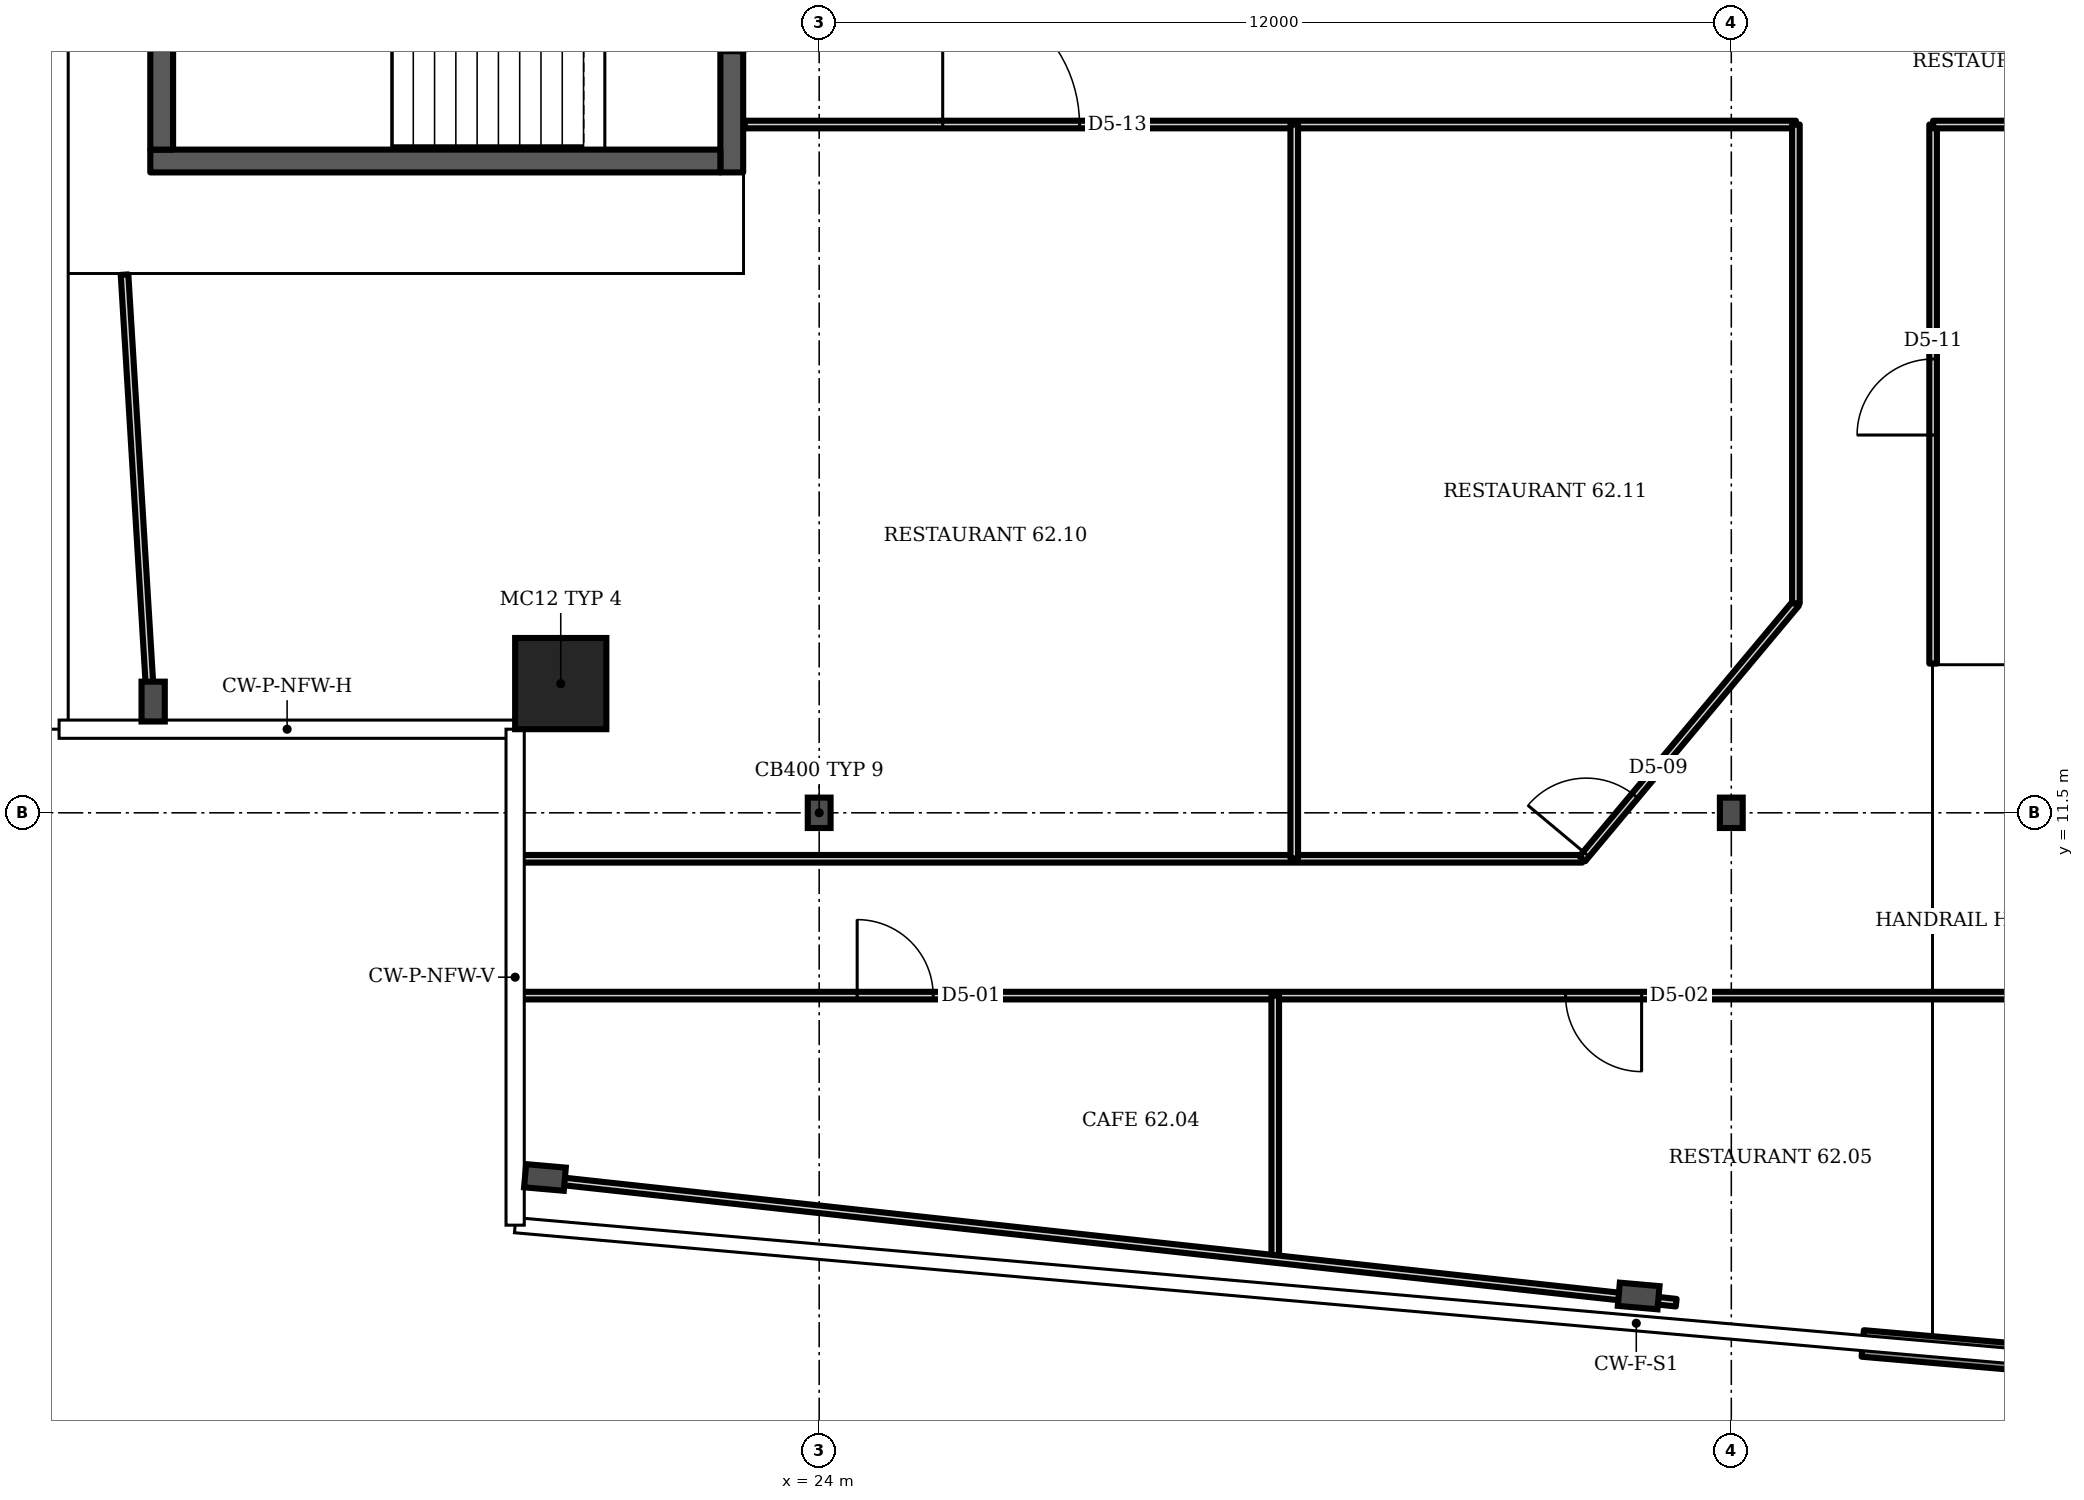
"""IFC4 building model, lengths in metres.
Left out: names, types, materials, properties, quantities, classifications, styles, units other than length and angle.
Written with IfcOpenShell. Run it as: python <this file> out.ifc"""

import sys

from ifc_helpers import new_model, si_unit, direction, frame, frame_2d, origin, origin_2d, place, context, subcontext, project, spatial, rectangle, i_section, extrude, element, fill, save


model = new_model("IFC4")
c1 = context("Model", 3, precision=1e-05, world=origin(), true_north=direction((0.0, 1.0)))
c2 = subcontext(c1, "Body", "Model", "MODEL_VIEW")
j1 = project(units=[si_unit("LENGTHUNIT", "METRE"), si_unit("PLANEANGLEUNIT", "RADIAN")], contexts=[c1])
p1 = place(None, origin())
s1 = spatial("IfcSite", under=j1, at=p1, CompositionType="ELEMENT")
p2 = place(p1, origin())
s2 = spatial("IfcBuilding", under=s1, at=p2, CompositionType="ELEMENT")
p3 = place(p2, frame((0.0, 0.0, 246.7)))
s3 = spatial("IfcBuildingStorey", under=s2, at=p3, CompositionType="ELEMENT", Elevation=246.7)
p4 = place(p3, frame((20.6, 13.2, 0.0), z_axis=(0.0, 0.0, 1.0), x_axis=(1.0, 0.0, 0.0)))
e1 = element("IfcColumn", 1, at=p4, inside=s3, PredefinedType="COLUMN", context=c2, shape_type="SweptSolid", body=[
    extrude(rectangle(XDim=1.2, YDim=1.2, at=origin_2d()), origin(), (0.0, 0.0, 1.0), 3.6),
])
for number, where, z_axis, x_axis in (
    (2, (20.392, 6.703, 0.0), (0.0, 0.0, 1.0), (-0.087, -0.996, 0.0)),
    (3, (34.781, 5.143, 0.0), (0.0, 0.0, 1.0), (-0.087, -0.996, 0.0)),
    (4, (15.238, 12.963, 0.0), (0.0, 0.0, 1.0), (-1.0, 0.0, 0.0)),
):
    element("IfcColumn", number, at=place(p3, frame(where, z_axis=z_axis, x_axis=x_axis)), inside=s3, PredefinedType="COLUMN", context=c2, shape_type="SweptSolid", body=[
        extrude(i_section(OverallWidth=0.306, OverallDepth=0.524, WebThickness=0.021, FlangeThickness=0.04, FilletRadius=0.027, at=origin_2d()), origin(), (0.0, 0.0, 1.0), 3.6),
    ])
for number, where, z_axis, x_axis in (
    (5, (24.0, 11.5, 0.0), (0.0, 0.0, 1.0), (1.0, 0.0, 0.0)),
    (6, (36.0, 11.5, 0.0), (0.0, 0.0, 1.0), (1.0, 0.0, 0.0)),
):
    element("IfcColumn", number, at=place(p3, frame(where, z_axis=z_axis, x_axis=x_axis)), inside=s3, PredefinedType="COLUMN", context=c2, shape_type="SweptSolid", body=[
        extrude(i_section(OverallWidth=0.3, OverallDepth=0.4, WebThickness=0.013, FlangeThickness=0.024, FilletRadius=0.027, at=origin_2d()), origin(), (0.0, 0.0, 1.0), 3.6),
    ])
p5 = place(p3, frame((37.729, 4.519, 0.0), z_axis=(0.0, 0.0, 1.0), x_axis=(0.99619, -0.087167, 0.0)))
e7 = element("IfcWall", 7, at=p5, inside=s3, PredefinedType="SOLIDWALL", context=c2, shape_type="SweptSolid", body=[
    extrude(rectangle(XDim=11.831, YDim=0.35, at=frame_2d((5.915, 0.0))), origin(), (0.0, 0.0, 1.0), 1.0),
])
p6 = place(p3, frame((22.85, 19.925, 0.0), z_axis=(0.0, 0.0, 1.0), x_axis=(0.0, 1.0, 0.0)))
e8 = element("IfcWall", 8, at=p6, inside=s3, PredefinedType="SHEAR", context=c2, shape_type="SweptSolid", body=[
    extrude(rectangle(XDim=4.35, YDim=0.3, at=frame_2d((2.175, 0.0))), origin(), (0.0, 0.0, 1.0), 3.2),
])
p7 = place(p6, frame((1.575, 0.0, 0.0)))
e9 = element("IfcOpeningElement", 9, at=p7, cuts=e8, PredefinedType="OPENING", context=c2, shape_type="SweptSolid", body=[
    extrude(rectangle(XDim=1.2, YDim=2.1, at=frame_2d((0.6, 1.05))), frame((0.0, 0.16, 0.0), z_axis=(0.0, -1.0, 0.0), x_axis=(1.0, 0.0, 0.0)), (0.0, 0.0, 1.0), 0.32),
])
p8 = place(p3, frame((15.224, 12.62, 0.0), z_axis=(0.0, 0.0, 1.0), x_axis=(-0.060759, 0.998149, 0.0)))
e10 = element("IfcWall", 10, at=p8, inside=s3, PredefinedType="PARTITIONING", context=c2, shape_type="SweptSolid", body=[
    extrude(rectangle(XDim=5.971, YDim=0.1, at=frame_2d((2.985, 0.0))), origin(), (0.0, 0.0, 1.0), 3.2),
])
p9 = place(p3, frame((20.02, 9.095, 0.0), z_axis=(0.0, 0.0, 1.0), x_axis=(1.0, 0.0, 0.0)))
e11 = element("IfcWall", 11, at=p9, inside=s3, PredefinedType="PARTITIONING", context=c2, shape_type="SweptSolid", body=[
    extrude(rectangle(XDim=19.957, YDim=0.1, at=frame_2d((9.979, 0.0))), origin(), (0.0, 0.0, 1.0), 3.2),
])
p10 = place(p9, frame((4.48, 0.0, 0.0)))
e12 = element("IfcOpeningElement", 12, at=p10, cuts=e11, PredefinedType="OPENING", context=c2, shape_type="SweptSolid", body=[
    extrude(rectangle(XDim=1.0, YDim=2.1, at=frame_2d((0.5, 1.05))), frame((0.0, 0.06, 0.0), z_axis=(0.0, -1.0, 0.0), x_axis=(1.0, 0.0, 0.0)), (0.0, 0.0, 1.0), 0.12),
])
p11 = place(p9, frame((13.8, 0.0, 0.0)))
e13 = element("IfcOpeningElement", 13, at=p11, cuts=e11, PredefinedType="OPENING", context=c2, shape_type="SweptSolid", body=[
    extrude(rectangle(XDim=1.0, YDim=2.1, at=frame_2d((0.5, 1.05))), frame((0.0, 0.06, 0.0), z_axis=(0.0, -1.0, 0.0), x_axis=(1.0, 0.0, 0.0)), (0.0, 0.0, 1.0), 0.12),
])
p12 = place(p3, frame((20.02, 10.895, 0.0), z_axis=(0.0, 0.0, 1.0), x_axis=(1.0, 0.0, 0.0)))
e14 = element("IfcWall", 14, at=p12, inside=s3, PredefinedType="PARTITIONING", context=c2, shape_type="SweptSolid", body=[
    extrude(rectangle(XDim=14.02, YDim=0.1, at=frame_2d((7.01, 0.0))), origin(), (0.0, 0.0, 1.0), 3.2),
])
p13 = place(p3, frame((23.02, 20.555, 0.0), z_axis=(0.0, 0.0, 1.0), x_axis=(1.0, 0.0, 0.0)))
e15 = element("IfcWall", 15, at=p13, inside=s3, PredefinedType="PARTITIONING", context=c2, shape_type="SweptSolid", body=[
    extrude(rectangle(XDim=13.83, YDim=0.1, at=frame_2d((6.915, 0.0))), origin(), (0.0, 0.0, 1.0), 3.2),
])
p14 = place(p13, frame((2.605, 0.0, 0.0)))
e16 = element("IfcOpeningElement", 16, at=p14, cuts=e15, PredefinedType="OPENING", context=c2, shape_type="SweptSolid", body=[
    extrude(rectangle(XDim=1.8, YDim=2.1, at=frame_2d((0.9, 1.05))), frame((0.0, 0.06, 0.0), z_axis=(0.0, -1.0, 0.0), x_axis=(1.0, 0.0, 0.0)), (0.0, 0.0, 1.0), 0.12),
])
p15 = place(p3, frame((30.0, 5.63, 0.0), z_axis=(0.0, 0.0, 1.0), x_axis=(0.0, 1.0, 0.0)))
e17 = element("IfcWall", 17, at=p15, inside=s3, PredefinedType="PARTITIONING", context=c2, shape_type="SweptSolid", body=[
    extrude(rectangle(XDim=3.465, YDim=0.1, at=frame_2d((1.732, 0.0))), origin(), (0.0, 0.0, 1.0), 3.2),
])
p16 = place(p3, frame((30.25, 10.9, 0.0), z_axis=(0.0, 0.0, 1.0), x_axis=(0.0, 1.0, 0.0)))
e18 = element("IfcWall", 18, at=p16, inside=s3, PredefinedType="PARTITIONING", context=c2, shape_type="SweptSolid", body=[
    extrude(rectangle(XDim=9.655, YDim=0.1, at=frame_2d((4.828, 0.0))), origin(), (0.0, 0.0, 1.0), 3.2),
])
p17 = place(p3, frame((34.04, 10.895, 0.0), z_axis=(0.0, 0.0, 1.0), x_axis=(0.641555, 0.767079, 0.0)))
e19 = element("IfcWall", 19, at=p17, inside=s3, PredefinedType="PARTITIONING", context=c2, shape_type="SweptSolid", body=[
    extrude(rectangle(XDim=4.38, YDim=0.1, at=frame_2d((2.19, 0.0))), origin(), (0.0, 0.0, 1.0), 3.2),
])
p18 = place(p17, frame((0.08, 0.0, 0.0)))
e20 = element("IfcOpeningElement", 20, at=p18, cuts=e19, PredefinedType="OPENING", context=c2, shape_type="SweptSolid", body=[
    extrude(rectangle(XDim=1.0, YDim=2.1, at=frame_2d((0.5, 1.05))), frame((0.0, 0.06, 0.0), z_axis=(0.0, -1.0, 0.0), x_axis=(1.0, 0.0, 0.0)), (0.0, 0.0, 1.0), 0.12),
])
p19 = place(p3, frame((35.275, 5.055, 0.0), z_axis=(0.0, 0.0, 1.0), x_axis=(-0.994114, 0.108368, 0.0)))
e21 = element("IfcWall", 21, at=p19, inside=s3, PredefinedType="PARTITIONING", context=c2, shape_type="SweptSolid", body=[
    extrude(rectangle(XDim=15.335, YDim=0.1, at=frame_2d((7.668, 0.0))), origin(), (0.0, 0.0, 1.0), 2.58),
])
p20 = place(p3, frame((36.85, 14.255, 0.0), z_axis=(0.0, 0.0, 1.0), x_axis=(0.0, 1.0, 0.0)))
e22 = element("IfcWall", 22, at=p20, inside=s3, PredefinedType="PARTITIONING", context=c2, shape_type="SweptSolid", body=[
    extrude(rectangle(XDim=6.3, YDim=0.1, at=frame_2d((3.15, 0.0))), origin(), (0.0, 0.0, 1.0), 3.2),
])
p21 = place(p3, frame((38.655, 13.463, 0.0), z_axis=(0.0, 0.0, 1.0), x_axis=(0.0, 1.0, 0.0)))
e23 = element("IfcWall", 23, at=p21, inside=s3, PredefinedType="PARTITIONING", context=c2, shape_type="SweptSolid", body=[
    extrude(rectangle(XDim=7.092, YDim=0.1, at=frame_2d((3.546, 0.0))), origin(), (0.0, 0.0, 1.0), 3.2),
])
p22 = place(p21, frame((3.007, 0.0, 0.0)))
e24 = element("IfcOpeningElement", 24, at=p22, cuts=e23, PredefinedType="OPENING", context=c2, shape_type="SweptSolid", body=[
    extrude(rectangle(XDim=1.0, YDim=2.1, at=frame_2d((0.5, 1.05))), frame((0.0, 0.06, 0.0), z_axis=(0.0, -1.0, 0.0), x_axis=(1.0, 0.0, 0.0)), (0.0, 0.0, 1.0), 0.12),
])
p23 = place(p3, frame((38.655, 20.555, 0.0), z_axis=(0.0, 0.0, 1.0), x_axis=(1.0, 0.0, 0.0)))
e25 = element("IfcWall", 25, at=p23, inside=s3, PredefinedType="PARTITIONING", context=c2, shape_type="SweptSolid", body=[
    extrude(rectangle(XDim=2.22, YDim=0.1, at=frame_2d((1.11, 0.0))), origin(), (0.0, 0.0, 1.0), 3.2),
])
p24 = place(p3, frame((15.2, 20.075, 0.0), z_axis=(0.0, 0.0, 1.0), x_axis=(1.0, 0.0, 0.0)))
e26 = element("IfcWall", 26, at=p24, inside=s3, PredefinedType="SHEAR", context=c2, shape_type="SweptSolid", body=[
    extrude(rectangle(XDim=7.5, YDim=0.3, at=frame_2d((3.75, 0.0))), origin(), (0.0, 0.0, 1.0), 3.2),
])
p25 = place(p3, frame((15.35, 20.225, 0.0), z_axis=(0.0, 0.0, 1.0), x_axis=(0.0, 1.0, 0.0)))
e27 = element("IfcWall", 27, at=p25, inside=s3, PredefinedType="SHEAR", context=c2, shape_type="SweptSolid", body=[
    extrude(rectangle(XDim=3.75, YDim=0.3, at=frame_2d((1.875, 0.0))), origin(), (0.0, 0.0, 1.0), 3.2),
])
p26 = place(p7, origin())
e28 = element("IfcDoor", 28, at=p26, inside=s3, OperationType="SINGLE_SWING_RIGHT", PredefinedType="DOOR", context=c2, shape_type="SweptSolid", body=[
    extrude(rectangle(XDim=1.2, YDim=2.1, at=frame_2d((0.6, 1.05))), frame((0.0, 0.025, 0.0), z_axis=(0.0, -1.0, 0.0), x_axis=(1.0, 0.0, 0.0)), (0.0, 0.0, 1.0), 0.05),
])
fill(e9, e28)
p27 = place(p10, origin())
e29 = element("IfcDoor", 29, at=p27, inside=s3, OperationType="SINGLE_SWING_LEFT", PredefinedType="DOOR", context=c2, shape_type="SweptSolid", body=[
    extrude(rectangle(XDim=1.0, YDim=2.1, at=frame_2d((0.5, 1.05))), frame((0.0, 0.025, 0.0), z_axis=(0.0, -1.0, 0.0), x_axis=(1.0, 0.0, 0.0)), (0.0, 0.0, 1.0), 0.05),
])
fill(e12, e29)
p28 = place(p11, origin())
e30 = element("IfcDoor", 30, at=p28, inside=s3, OperationType="SINGLE_SWING_RIGHT", PredefinedType="DOOR", context=c2, shape_type="SweptSolid", body=[
    extrude(rectangle(XDim=1.0, YDim=2.1, at=frame_2d((0.5, 1.05))), frame((0.0, 0.025, 0.0), z_axis=(0.0, -1.0, 0.0), x_axis=(1.0, 0.0, 0.0)), (0.0, 0.0, 1.0), 0.05),
])
fill(e13, e30)
p29 = place(p18, origin())
e31 = element("IfcDoor", 31, at=p29, inside=s3, OperationType="SINGLE_SWING_LEFT", PredefinedType="DOOR", context=c2, shape_type="SweptSolid", body=[
    extrude(rectangle(XDim=1.0, YDim=2.1, at=frame_2d((0.5, 1.05))), frame((0.0, 0.025, 0.0), z_axis=(0.0, -1.0, 0.0), x_axis=(1.0, 0.0, 0.0)), (0.0, 0.0, 1.0), 0.05),
])
fill(e20, e31)
p30 = place(p22, origin())
e32 = element("IfcDoor", 32, at=p30, inside=s3, OperationType="SINGLE_SWING_LEFT", PredefinedType="DOOR", context=c2, shape_type="SweptSolid", body=[
    extrude(rectangle(XDim=1.0, YDim=2.1, at=frame_2d((0.5, 1.05))), frame((0.0, 0.025, 0.0), z_axis=(0.0, -1.0, 0.0), x_axis=(1.0, 0.0, 0.0)), (0.0, 0.0, 1.0), 0.05),
])
fill(e24, e32)
p31 = place(p14, origin())
e33 = element("IfcDoor", 33, at=p31, inside=s3, OperationType="DOUBLE_DOOR_SINGLE_SWING", PredefinedType="DOOR", context=c2, shape_type="SweptSolid", body=[
    extrude(rectangle(XDim=1.8, YDim=2.1, at=frame_2d((0.9, 1.05))), frame((0.0, 0.025, 0.0), z_axis=(0.0, -1.0, 0.0), x_axis=(1.0, 0.0, 0.0)), (0.0, 0.0, 1.0), 0.05),
])
fill(e16, e33)
save(model, sys.argv[1])
